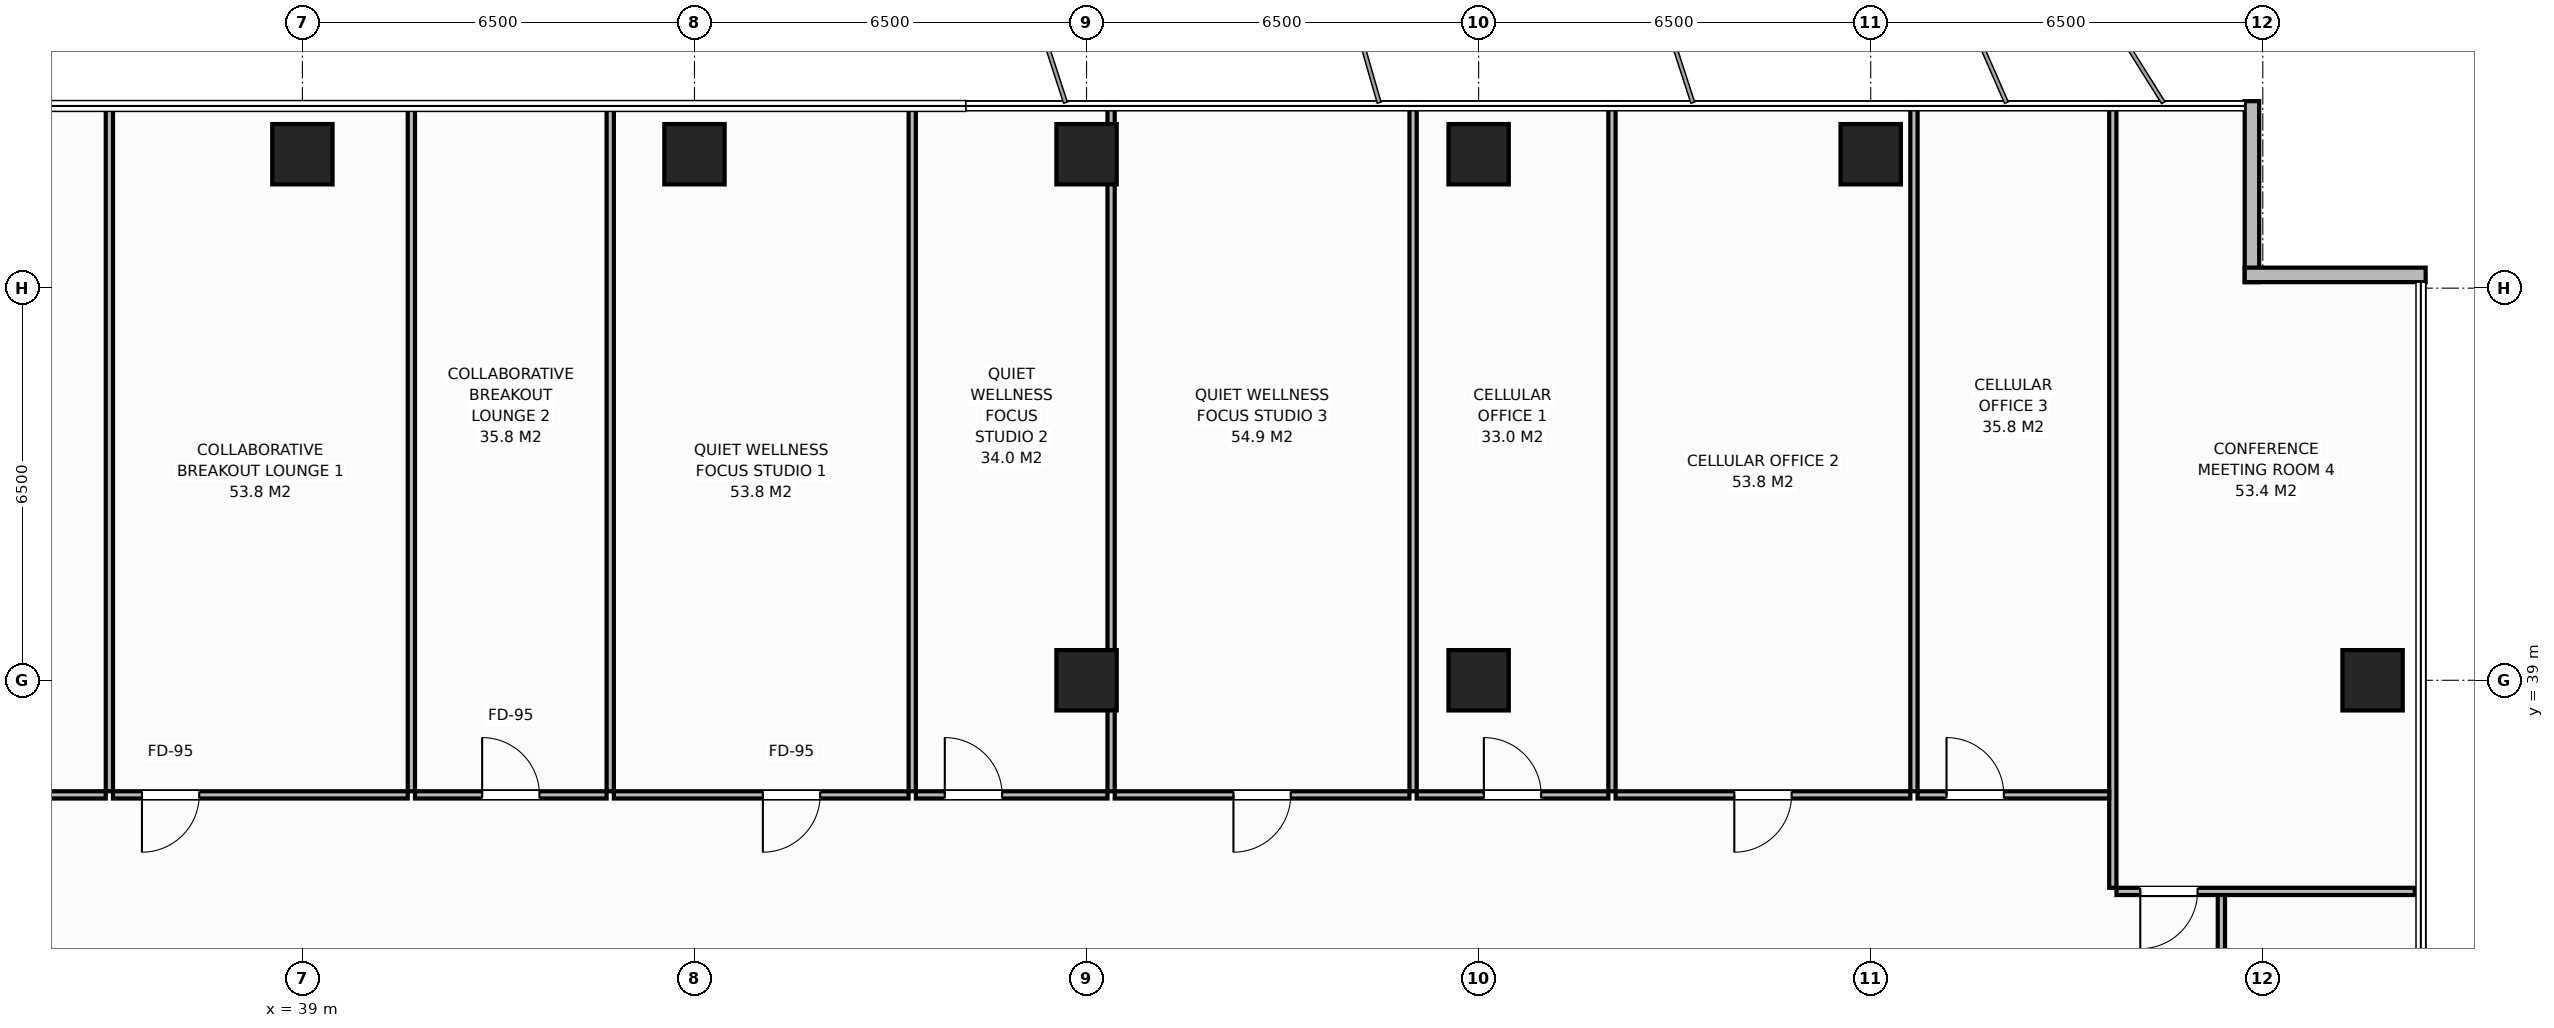
"""IFC4 building model, lengths in metres.
Left out: names, types, materials, properties, quantities, classifications, styles, units other than length and angle.
Written with IfcOpenShell. Run it as: python <this file> out.ifc"""

import sys

from ifc_helpers import new_model, si_unit, direction, frame, frame_2d, origin, origin_2d, place, context, subcontext, project, spatial, rectangle, extrude, element, fill, save


model = new_model("IFC4")
c1 = context("Model", 3, precision=1e-05, world=origin(), true_north=direction((0.0, 1.0)))
c2 = subcontext(c1, "Body", "Model", "MODEL_VIEW")
j1 = project(units=[si_unit("LENGTHUNIT", "METRE"), si_unit("PLANEANGLEUNIT", "RADIAN")], contexts=[c1])
p1 = place(None, origin())
s1 = spatial("IfcSite", under=j1, at=p1, CompositionType="ELEMENT")
p2 = place(p1, origin())
s2 = spatial("IfcBuilding", under=s1, at=p2, CompositionType="ELEMENT")
p3 = place(p2, frame((0.0, 0.0, 186.0)))
s3 = spatial("IfcBuildingStorey", under=s2, at=p3, CompositionType="ELEMENT", Elevation=186.0)
for number, where, z_axis, x_axis in (
    (1, (58.5, 39.0, 0.0), (0.0, 0.0, 1.0), (1.0, 0.0, 0.0)),
    (2, (52.0, 39.0, 0.0), (0.0, 0.0, 1.0), (1.0, 0.0, 0.0)),
    (3, (39.0, 47.72, 0.0), (0.0, 0.0, 1.0), (1.0, 0.0, 0.0)),
    (4, (45.5, 47.72, 0.0), (0.0, 0.0, 1.0), (1.0, 0.0, 0.0)),
    (5, (52.0, 47.72, 0.0), (0.0, 0.0, 1.0), (1.0, 0.0, 0.0)),
    (6, (58.5, 47.72, 0.0), (0.0, 0.0, 1.0), (1.0, 0.0, 0.0)),
    (7, (65.0, 47.72, 0.0), (0.0, 0.0, 1.0), (1.0, 0.0, 0.0)),
    (8, (73.32, 39.0, 0.0), (0.0, 0.0, 1.0), (1.0, 0.0, 0.0)),
):
    element("IfcColumn", number, at=place(p3, frame(where, z_axis=z_axis, x_axis=x_axis)), inside=s3, PredefinedType="COLUMN", context=c2, shape_type="SweptSolid", body=[
        extrude(rectangle(XDim=1.0, YDim=1.0, at=origin_2d()), origin(), (0.0, 0.0, 1.0), 3.8),
    ])
for number, where, z_axis, x_axis in (
    (9, (71.32, 48.6, 0.0), (0.0, 0.0, 1.0), (0.0, -1.0, 0.0)),
    (10, (71.2, 45.72, 0.0), (0.0, 0.0, 1.0), (1.0, 0.0, 0.0)),
):
    element("IfcWall", number, at=place(p3, frame(where, z_axis=z_axis, x_axis=x_axis)), inside=s3, PredefinedType="STANDARD", context=c2, shape_type="SweptSolid", body=[
        extrude(rectangle(XDim=3.0, YDim=0.24, at=frame_2d((1.5, 0.0))), origin(), (0.0, 0.0, 1.0), 3.572),
    ])
p4 = place(p3, frame((70.813, 33.4, 0.0), z_axis=(0.0, 0.0, 1.0), x_axis=(0.0, 1.0, 0.0)))
e11 = element("IfcWall", 11, at=p4, inside=s3, PredefinedType="PARTITIONING", context=c2, shape_type="SweptSolid", body=[
    extrude(rectangle(XDim=2.1, YDim=0.12, at=frame_2d((1.05, 0.0))), origin(), (0.0, 0.0, 1.0), 3.572),
])
p5 = place(p3, frame((35.8, 37.16, 0.0), z_axis=(0.0, 0.0, 1.0), x_axis=(0.0, 1.0, 0.0)))
e12 = element("IfcWall", 12, at=p5, inside=s3, PredefinedType="PARTITIONING", context=c2, shape_type="SweptSolid", body=[
    extrude(rectangle(XDim=11.42, YDim=0.12, at=frame_2d((5.71, 0.0))), origin(), (0.0, 0.0, 1.0), 3.572),
])
p6 = place(p3, frame((26.42, 37.1, 0.0), z_axis=(0.0, 0.0, 1.0), x_axis=(1.0, 0.0, 0.0)))
e13 = element("IfcWall", 13, at=p6, inside=s3, PredefinedType="PARTITIONING", context=c2, shape_type="SweptSolid", body=[
    extrude(rectangle(XDim=9.32, YDim=0.12, at=frame_2d((4.66, 0.0))), origin(), (0.0, 0.0, 1.0), 3.572),
])
p7 = place(p6, frame((4.185, 0.0, 0.0)))
e14 = element("IfcOpeningElement", 14, at=p7, cuts=e13, PredefinedType="OPENING", context=c2, shape_type="SweptSolid", body=[
    extrude(rectangle(XDim=0.95, YDim=2.15, at=frame_2d((0.475, 1.075))), frame((0.0, 0.07, 0.0), z_axis=(0.0, -1.0, 0.0), x_axis=(1.0, 0.0, 0.0)), (0.0, 0.0, 1.0), 0.14),
])
p8 = place(p3, frame((40.806, 37.16, 0.0), z_axis=(0.0, 0.0, 1.0), x_axis=(0.0, 1.0, 0.0)))
e15 = element("IfcWall", 15, at=p8, inside=s3, PredefinedType="PARTITIONING", context=c2, shape_type="SweptSolid", body=[
    extrude(rectangle(XDim=11.42, YDim=0.12, at=frame_2d((5.71, 0.0))), origin(), (0.0, 0.0, 1.0), 3.572),
])
p9 = place(p3, frame((35.86, 37.1, 0.0), z_axis=(0.0, 0.0, 1.0), x_axis=(1.0, 0.0, 0.0)))
e16 = element("IfcWall", 16, at=p9, inside=s3, PredefinedType="PARTITIONING", context=c2, shape_type="SweptSolid", body=[
    extrude(rectangle(XDim=4.886, YDim=0.12, at=frame_2d((2.443, 0.0))), origin(), (0.0, 0.0, 1.0), 3.572),
])
p10 = place(p9, frame((0.48, 0.0, 0.0)))
e17 = element("IfcOpeningElement", 17, at=p10, cuts=e16, PredefinedType="OPENING", context=c2, shape_type="SweptSolid", body=[
    extrude(rectangle(XDim=0.95, YDim=2.15, at=frame_2d((0.475, 1.075))), frame((0.0, 0.07, 0.0), z_axis=(0.0, -1.0, 0.0), x_axis=(1.0, 0.0, 0.0)), (0.0, 0.0, 1.0), 0.14),
])
p11 = place(p3, frame((44.104, 37.16, 0.0), z_axis=(0.0, 0.0, 1.0), x_axis=(0.0, 1.0, 0.0)))
e18 = element("IfcWall", 18, at=p11, inside=s3, PredefinedType="PARTITIONING", context=c2, shape_type="SweptSolid", body=[
    extrude(rectangle(XDim=11.42, YDim=0.12, at=frame_2d((5.71, 0.0))), origin(), (0.0, 0.0, 1.0), 3.572),
])
p12 = place(p3, frame((40.866, 37.1, 0.0), z_axis=(0.0, 0.0, 1.0), x_axis=(1.0, 0.0, 0.0)))
e19 = element("IfcWall", 19, at=p12, inside=s3, PredefinedType="PARTITIONING", context=c2, shape_type="SweptSolid", body=[
    extrude(rectangle(XDim=3.177, YDim=0.12, at=frame_2d((1.588, 0.0))), origin(), (0.0, 0.0, 1.0), 3.572),
])
p13 = place(p12, frame((1.113, 0.0, 0.0)))
e20 = element("IfcOpeningElement", 20, at=p13, cuts=e19, PredefinedType="OPENING", context=c2, shape_type="SweptSolid", body=[
    extrude(rectangle(XDim=0.95, YDim=2.15, at=frame_2d((0.475, 1.075))), frame((0.0, 0.07, 0.0), z_axis=(0.0, -1.0, 0.0), x_axis=(1.0, 0.0, 0.0)), (0.0, 0.0, 1.0), 0.14),
])
p14 = place(p3, frame((49.11, 37.16, 0.0), z_axis=(0.0, 0.0, 1.0), x_axis=(0.0, 1.0, 0.0)))
e21 = element("IfcWall", 21, at=p14, inside=s3, PredefinedType="PARTITIONING", context=c2, shape_type="SweptSolid", body=[
    extrude(rectangle(XDim=11.42, YDim=0.12, at=frame_2d((5.71, 0.0))), origin(), (0.0, 0.0, 1.0), 3.572),
])
p15 = place(p3, frame((44.163, 37.1, 0.0), z_axis=(0.0, 0.0, 1.0), x_axis=(1.0, 0.0, 0.0)))
e22 = element("IfcWall", 22, at=p15, inside=s3, PredefinedType="PARTITIONING", context=c2, shape_type="SweptSolid", body=[
    extrude(rectangle(XDim=4.886, YDim=0.12, at=frame_2d((2.443, 0.0))), origin(), (0.0, 0.0, 1.0), 3.572),
])
p16 = place(p15, frame((2.47, 0.0, 0.0)))
e23 = element("IfcOpeningElement", 23, at=p16, cuts=e22, PredefinedType="OPENING", context=c2, shape_type="SweptSolid", body=[
    extrude(rectangle(XDim=0.95, YDim=2.15, at=frame_2d((0.475, 1.075))), frame((0.0, 0.07, 0.0), z_axis=(0.0, -1.0, 0.0), x_axis=(1.0, 0.0, 0.0)), (0.0, 0.0, 1.0), 0.14),
])
p17 = place(p3, frame((52.407, 37.16, 0.0), z_axis=(0.0, 0.0, 1.0), x_axis=(0.0, 1.0, 0.0)))
e24 = element("IfcWall", 24, at=p17, inside=s3, PredefinedType="PARTITIONING", context=c2, shape_type="SweptSolid", body=[
    extrude(rectangle(XDim=11.42, YDim=0.12, at=frame_2d((5.71, 0.0))), origin(), (0.0, 0.0, 1.0), 3.572),
])
p18 = place(p3, frame((49.17, 37.1, 0.0), z_axis=(0.0, 0.0, 1.0), x_axis=(1.0, 0.0, 0.0)))
e25 = element("IfcWall", 25, at=p18, inside=s3, PredefinedType="PARTITIONING", context=c2, shape_type="SweptSolid", body=[
    extrude(rectangle(XDim=3.177, YDim=0.12, at=frame_2d((1.588, 0.0))), origin(), (0.0, 0.0, 1.0), 3.572),
])
p19 = place(p18, frame((0.48, 0.0, 0.0)))
e26 = element("IfcOpeningElement", 26, at=p19, cuts=e25, PredefinedType="OPENING", context=c2, shape_type="SweptSolid", body=[
    extrude(rectangle(XDim=0.95, YDim=2.15, at=frame_2d((0.475, 1.075))), frame((0.0, 0.07, 0.0), z_axis=(0.0, -1.0, 0.0), x_axis=(1.0, 0.0, 0.0)), (0.0, 0.0, 1.0), 0.14),
])
p20 = place(p3, frame((57.413, 37.16, 0.0), z_axis=(0.0, 0.0, 1.0), x_axis=(0.0, 1.0, 0.0)))
e27 = element("IfcWall", 27, at=p20, inside=s3, PredefinedType="PARTITIONING", context=c2, shape_type="SweptSolid", body=[
    extrude(rectangle(XDim=11.42, YDim=0.12, at=frame_2d((5.71, 0.0))), origin(), (0.0, 0.0, 1.0), 3.572),
])
p21 = place(p3, frame((52.467, 37.1, 0.0), z_axis=(0.0, 0.0, 1.0), x_axis=(1.0, 0.0, 0.0)))
e28 = element("IfcWall", 28, at=p21, inside=s3, PredefinedType="PARTITIONING", context=c2, shape_type="SweptSolid", body=[
    extrude(rectangle(XDim=4.886, YDim=0.12, at=frame_2d((2.443, 0.0))), origin(), (0.0, 0.0, 1.0), 3.572),
])
p22 = place(p21, frame((1.968, 0.0, 0.0)))
e29 = element("IfcOpeningElement", 29, at=p22, cuts=e28, PredefinedType="OPENING", context=c2, shape_type="SweptSolid", body=[
    extrude(rectangle(XDim=0.95, YDim=2.15, at=frame_2d((0.475, 1.075))), frame((0.0, 0.07, 0.0), z_axis=(0.0, -1.0, 0.0), x_axis=(1.0, 0.0, 0.0)), (0.0, 0.0, 1.0), 0.14),
])
p23 = place(p3, frame((60.71, 37.16, 0.0), z_axis=(0.0, 0.0, 1.0), x_axis=(0.0, 1.0, 0.0)))
e30 = element("IfcWall", 30, at=p23, inside=s3, PredefinedType="PARTITIONING", context=c2, shape_type="SweptSolid", body=[
    extrude(rectangle(XDim=11.42, YDim=0.12, at=frame_2d((5.71, 0.0))), origin(), (0.0, 0.0, 1.0), 3.572),
])
p24 = place(p3, frame((57.473, 37.1, 0.0), z_axis=(0.0, 0.0, 1.0), x_axis=(1.0, 0.0, 0.0)))
e31 = element("IfcWall", 31, at=p24, inside=s3, PredefinedType="PARTITIONING", context=c2, shape_type="SweptSolid", body=[
    extrude(rectangle(XDim=3.177, YDim=0.12, at=frame_2d((1.588, 0.0))), origin(), (0.0, 0.0, 1.0), 3.572),
])
p25 = place(p24, frame((1.114, 0.0, 0.0)))
e32 = element("IfcOpeningElement", 32, at=p25, cuts=e31, PredefinedType="OPENING", context=c2, shape_type="SweptSolid", body=[
    extrude(rectangle(XDim=0.95, YDim=2.15, at=frame_2d((0.475, 1.075))), frame((0.0, 0.07, 0.0), z_axis=(0.0, -1.0, 0.0), x_axis=(1.0, 0.0, 0.0)), (0.0, 0.0, 1.0), 0.14),
])
p26 = place(p3, frame((65.717, 37.16, 0.0), z_axis=(0.0, 0.0, 1.0), x_axis=(0.0, 1.0, 0.0)))
e33 = element("IfcWall", 33, at=p26, inside=s3, PredefinedType="PARTITIONING", context=c2, shape_type="SweptSolid", body=[
    extrude(rectangle(XDim=11.42, YDim=0.12, at=frame_2d((5.71, 0.0))), origin(), (0.0, 0.0, 1.0), 3.572),
])
p27 = place(p3, frame((60.77, 37.1, 0.0), z_axis=(0.0, 0.0, 1.0), x_axis=(1.0, 0.0, 0.0)))
e34 = element("IfcWall", 34, at=p27, inside=s3, PredefinedType="PARTITIONING", context=c2, shape_type="SweptSolid", body=[
    extrude(rectangle(XDim=4.886, YDim=0.12, at=frame_2d((2.443, 0.0))), origin(), (0.0, 0.0, 1.0), 3.572),
])
p28 = place(p27, frame((1.968, 0.0, 0.0)))
e35 = element("IfcOpeningElement", 35, at=p28, cuts=e34, PredefinedType="OPENING", context=c2, shape_type="SweptSolid", body=[
    extrude(rectangle(XDim=0.95, YDim=2.15, at=frame_2d((0.475, 1.075))), frame((0.0, 0.07, 0.0), z_axis=(0.0, -1.0, 0.0), x_axis=(1.0, 0.0, 0.0)), (0.0, 0.0, 1.0), 0.14),
])
p29 = place(p3, frame((69.013, 35.56, 0.0), z_axis=(0.0, 0.0, 1.0), x_axis=(0.0, 1.0, 0.0)))
e36 = element("IfcWall", 36, at=p29, inside=s3, PredefinedType="PARTITIONING", context=c2, shape_type="SweptSolid", body=[
    extrude(rectangle(XDim=13.02, YDim=0.12, at=frame_2d((6.51, 0.0))), origin(), (0.0, 0.0, 1.0), 3.572),
])
p30 = place(p3, frame((65.777, 37.1, 0.0), z_axis=(0.0, 0.0, 1.0), x_axis=(1.0, 0.0, 0.0)))
e37 = element("IfcWall", 37, at=p30, inside=s3, PredefinedType="PARTITIONING", context=c2, shape_type="SweptSolid", body=[
    extrude(rectangle(XDim=3.177, YDim=0.12, at=frame_2d((1.588, 0.0))), origin(), (0.0, 0.0, 1.0), 3.572),
])
p31 = place(p30, frame((0.48, 0.0, 0.0)))
e38 = element("IfcOpeningElement", 38, at=p31, cuts=e37, PredefinedType="OPENING", context=c2, shape_type="SweptSolid", body=[
    extrude(rectangle(XDim=0.95, YDim=2.15, at=frame_2d((0.475, 1.075))), frame((0.0, 0.07, 0.0), z_axis=(0.0, -1.0, 0.0), x_axis=(1.0, 0.0, 0.0)), (0.0, 0.0, 1.0), 0.14),
])
p32 = place(p3, frame((69.073, 35.5, 0.0), z_axis=(0.0, 0.0, 1.0), x_axis=(1.0, 0.0, 0.0)))
e39 = element("IfcWall", 39, at=p32, inside=s3, PredefinedType="PARTITIONING", context=c2, shape_type="SweptSolid", body=[
    extrude(rectangle(XDim=4.947, YDim=0.12, at=frame_2d((2.473, 0.0))), origin(), (0.0, 0.0, 1.0), 3.572),
])
p33 = place(p32, frame((0.395, 0.0, 0.0)))
e40 = element("IfcOpeningElement", 40, at=p33, cuts=e39, PredefinedType="OPENING", context=c2, shape_type="SweptSolid", body=[
    extrude(rectangle(XDim=0.95, YDim=2.15, at=frame_2d((0.475, 1.075))), frame((0.0, 0.07, 0.0), z_axis=(0.0, -1.0, 0.0), x_axis=(1.0, 0.0, 0.0)), (0.0, 0.0, 1.0), 0.14),
])
p34 = place(p10, origin())
e41 = element("IfcDoor", 41, at=p34, inside=s3, OperationType="SINGLE_SWING_RIGHT", PredefinedType="DOOR", context=c2, shape_type="SweptSolid", body=[
    extrude(rectangle(XDim=0.95, YDim=2.15, at=frame_2d((0.475, 1.075))), frame((0.0, 0.025, 0.0), z_axis=(0.0, -1.0, 0.0), x_axis=(1.0, 0.0, 0.0)), (0.0, 0.0, 1.0), 0.05),
])
fill(e17, e41)
p35 = place(p13, origin())
e42 = element("IfcDoor", 42, at=p35, inside=s3, OperationType="SINGLE_SWING_LEFT", PredefinedType="DOOR", context=c2, shape_type="SweptSolid", body=[
    extrude(rectangle(XDim=0.95, YDim=2.15, at=frame_2d((0.475, 1.075))), frame((0.0, 0.025, 0.0), z_axis=(0.0, -1.0, 0.0), x_axis=(1.0, 0.0, 0.0)), (0.0, 0.0, 1.0), 0.05),
])
fill(e20, e42)
p36 = place(p16, origin())
e43 = element("IfcDoor", 43, at=p36, inside=s3, OperationType="SINGLE_SWING_RIGHT", PredefinedType="DOOR", context=c2, shape_type="SweptSolid", body=[
    extrude(rectangle(XDim=0.95, YDim=2.15, at=frame_2d((0.475, 1.075))), frame((0.0, 0.025, 0.0), z_axis=(0.0, -1.0, 0.0), x_axis=(1.0, 0.0, 0.0)), (0.0, 0.0, 1.0), 0.05),
])
fill(e23, e43)
p37 = place(p19, origin())
e44 = element("IfcDoor", 44, at=p37, inside=s3, OperationType="SINGLE_SWING_LEFT", PredefinedType="DOOR", context=c2, shape_type="SweptSolid", body=[
    extrude(rectangle(XDim=0.95, YDim=2.15, at=frame_2d((0.475, 1.075))), frame((0.0, 0.025, 0.0), z_axis=(0.0, -1.0, 0.0), x_axis=(1.0, 0.0, 0.0)), (0.0, 0.0, 1.0), 0.05),
])
fill(e26, e44)
p38 = place(p22, origin())
e45 = element("IfcDoor", 45, at=p38, inside=s3, OperationType="SINGLE_SWING_RIGHT", PredefinedType="DOOR", context=c2, shape_type="SweptSolid", body=[
    extrude(rectangle(XDim=0.95, YDim=2.15, at=frame_2d((0.475, 1.075))), frame((0.0, 0.025, 0.0), z_axis=(0.0, -1.0, 0.0), x_axis=(1.0, 0.0, 0.0)), (0.0, 0.0, 1.0), 0.05),
])
fill(e29, e45)
p39 = place(p25, origin())
e46 = element("IfcDoor", 46, at=p39, inside=s3, OperationType="SINGLE_SWING_LEFT", PredefinedType="DOOR", context=c2, shape_type="SweptSolid", body=[
    extrude(rectangle(XDim=0.95, YDim=2.15, at=frame_2d((0.475, 1.075))), frame((0.0, 0.025, 0.0), z_axis=(0.0, -1.0, 0.0), x_axis=(1.0, 0.0, 0.0)), (0.0, 0.0, 1.0), 0.05),
])
fill(e32, e46)
p40 = place(p28, origin())
e47 = element("IfcDoor", 47, at=p40, inside=s3, OperationType="SINGLE_SWING_RIGHT", PredefinedType="DOOR", context=c2, shape_type="SweptSolid", body=[
    extrude(rectangle(XDim=0.95, YDim=2.15, at=frame_2d((0.475, 1.075))), frame((0.0, 0.025, 0.0), z_axis=(0.0, -1.0, 0.0), x_axis=(1.0, 0.0, 0.0)), (0.0, 0.0, 1.0), 0.05),
])
fill(e35, e47)
p41 = place(p31, origin())
e48 = element("IfcDoor", 48, at=p41, inside=s3, OperationType="SINGLE_SWING_LEFT", PredefinedType="DOOR", context=c2, shape_type="SweptSolid", body=[
    extrude(rectangle(XDim=0.95, YDim=2.15, at=frame_2d((0.475, 1.075))), frame((0.0, 0.025, 0.0), z_axis=(0.0, -1.0, 0.0), x_axis=(1.0, 0.0, 0.0)), (0.0, 0.0, 1.0), 0.05),
])
fill(e38, e48)
p42 = place(p33, origin())
e49 = element("IfcDoor", 49, at=p42, inside=s3, OperationType="SINGLE_SWING_RIGHT", PredefinedType="DOOR", context=c2, shape_type="SweptSolid", body=[
    extrude(rectangle(XDim=0.95, YDim=2.15, at=frame_2d((0.475, 1.075))), frame((0.0, 0.025, 0.0), z_axis=(0.0, -1.0, 0.0), x_axis=(1.0, 0.0, 0.0)), (0.0, 0.0, 1.0), 0.05),
])
fill(e40, e49)
save(model, sys.argv[1])
